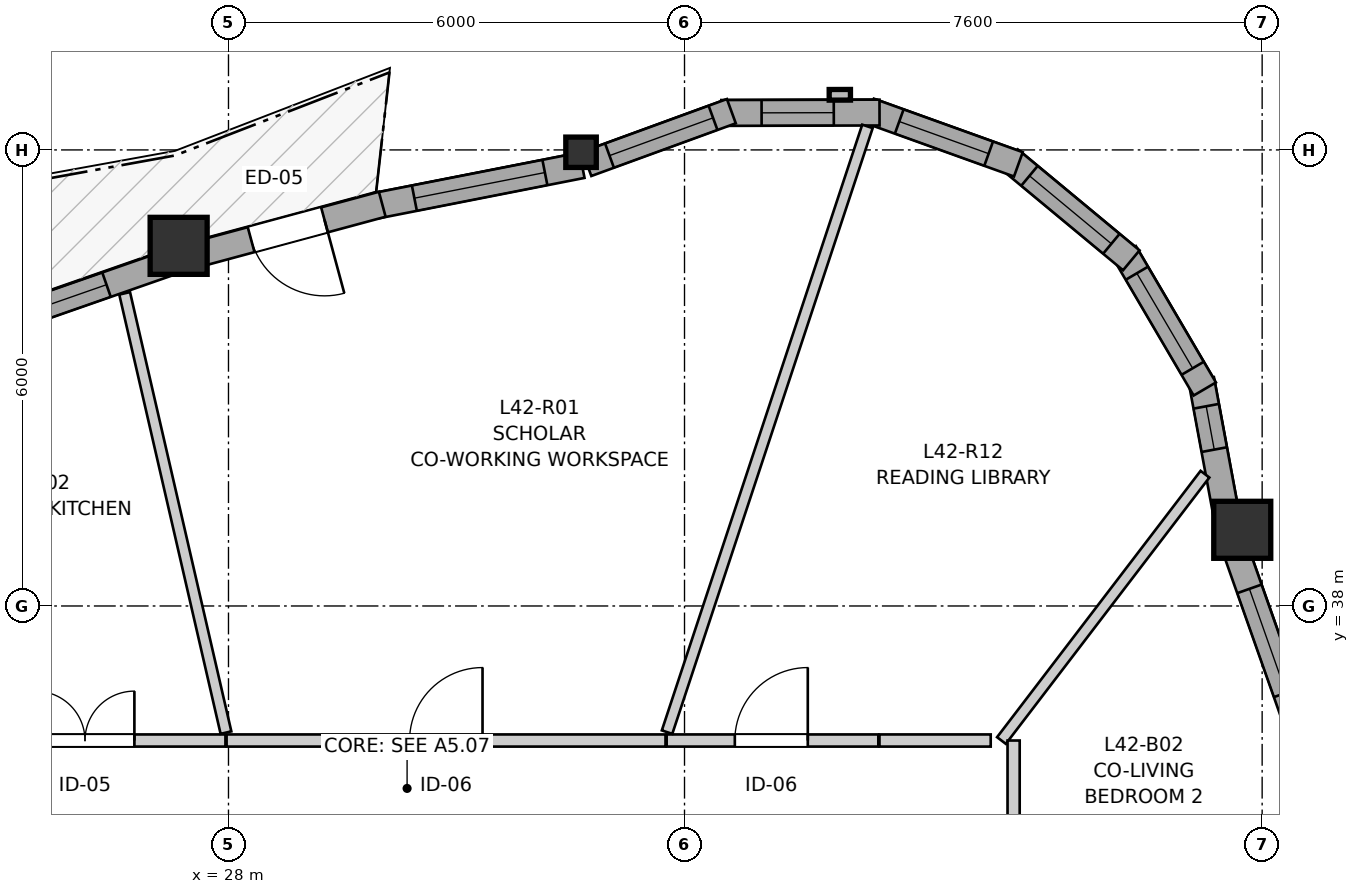
"""IFC4 building model, lengths in metres.
Left out: names, types, materials, properties, quantities, classifications, styles, units other than length and angle.
Written with IfcOpenShell. Run it as: python <this file> out.ifc"""

import sys

from ifc_helpers import new_model, si_unit, direction, frame, frame_2d, origin, origin_2d, place, context, subcontext, project, spatial, rectangle, i_section, extrude, source, transform, mapped, element, fill, save


model = new_model("IFC4")
c1 = context("Model", 3, precision=1e-05, world=origin(), true_north=direction((0.0, 1.0)))
c2 = subcontext(c1, "Body", "Model", "MODEL_VIEW")
j1 = project(units=[si_unit("LENGTHUNIT", "METRE"), si_unit("PLANEANGLEUNIT", "RADIAN")], contexts=[c1])
p1 = place(None, origin())
s1 = spatial("IfcSite", under=j1, at=p1, CompositionType="ELEMENT")
p2 = place(p1, origin())
s2 = spatial("IfcBuilding", under=s1, at=p2, CompositionType="ELEMENT")
p3 = place(p2, frame((0.0, 0.0, 142.6)))
s3 = spatial("IfcBuildingStorey", under=s2, at=p3, CompositionType="ELEMENT", Elevation=142.6)
m1 = source(origin(), c2, "Body", "SweptSolid", [
    extrude(rectangle(XDim=0.75, YDim=0.75, at=origin_2d()), origin(), (0.0, 0.0, 1.0), 2.95),
])
p4 = place(p3, frame((41.338, 39.002, 0.0), z_axis=(0.0, 0.0, 1.0), x_axis=(1.0, 0.0, 0.0)))
e1 = element("IfcColumn", 1, at=p4, inside=s3, PredefinedType="COLUMN", context=c2, shape_type="MappedRepresentation", body=[
    mapped(m1, transform((0.0, 0.0, 0.0), x_axis=(1.0, 0.0, 0.0), y_axis=(0.0, 1.0, 0.0), z_axis=(0.0, 0.0, 1.0), scale=1.0)),
])
m2 = source(origin(), c2, "Body", "SweptSolid", [
    extrude(i_section(OverallWidth=0.401, OverallDepth=0.399, WebThickness=0.023, FlangeThickness=0.036, FilletRadius=0.015, at=origin_2d()), origin(), (0.0, 0.0, 1.0), 2.95),
])
p5 = place(p3, frame((32.639, 43.969, 0.0), z_axis=(0.0, 0.0, 1.0), x_axis=(1.0, 0.0, 0.0)))
e2 = element("IfcColumn", 2, at=p5, inside=s3, PredefinedType="PILASTER", context=c2, shape_type="MappedRepresentation", body=[
    mapped(m2, transform((0.0, 0.0, 0.0), x_axis=(1.0, 0.0, 0.0), y_axis=(0.0, 1.0, 0.0), z_axis=(0.0, 0.0, 1.0), scale=1.0)),
])
p6 = place(p3, frame((27.344, 42.738, 0.0), z_axis=(0.0, 0.0, 1.0), x_axis=(1.0, 0.0, 0.0)))
e3 = element("IfcColumn", 3, at=p6, inside=s3, PredefinedType="COLUMN", context=c2, shape_type="MappedRepresentation", body=[
    mapped(m1, transform((0.0, 0.0, 0.0), x_axis=(1.0, 0.0, 0.0), y_axis=(0.0, 1.0, 0.0), z_axis=(0.0, 0.0, 1.0), scale=1.0)),
])
p7 = place(p3, frame((42.121, 36.274, 0.0), z_axis=(0.0, 0.0, 1.0), x_axis=(-0.332724751299, 0.943023986902, 0.0)))
e4 = element("IfcWall", 4, at=p7, inside=s3, PredefinedType="SOLIDWALL", context=c2, shape_type="SweptSolid", body=[
    extrude(rectangle(XDim=2.678, YDim=0.34, at=frame_2d((1.339, 0.0))), origin(), (0.0, 0.0, 1.0), 2.53),
])
p8 = place(p7, frame((0.619, 0.0, 0.82)))
e5 = element("IfcOpeningElement", 5, at=p8, cuts=e4, PredefinedType="OPENING", context=c2, shape_type="SweptSolid", body=[
    extrude(rectangle(XDim=1.45, YDim=1.25, at=frame_2d((0.725, 0.625))), frame((0.0, 0.18, 0.0), z_axis=(0.0, -1.0, 0.0), x_axis=(1.0, 0.0, 0.0)), (0.0, 0.0, 1.0), 0.36),
])
p9 = place(p3, frame((41.143, 39.124, 0.0), z_axis=(0.0, 0.0, 1.0), x_axis=(-0.182320770307, 0.983239104549, 0.0)))
e6 = element("IfcWall", 6, at=p9, inside=s3, PredefinedType="SOLIDWALL", context=c2, shape_type="SweptSolid", body=[
    extrude(rectangle(XDim=1.888, YDim=0.34, at=frame_2d((0.944, 0.0))), origin(), (0.0, 0.0, 1.0), 2.53),
])
p10 = place(p9, frame((0.949, 0.0, 0.82)))
e7 = element("IfcOpeningElement", 7, at=p10, cuts=e6, PredefinedType="OPENING", context=c2, shape_type="SweptSolid", body=[
    extrude(rectangle(XDim=0.58, YDim=1.35, at=frame_2d((0.29, 0.675))), frame((0.0, 0.18, 0.0), z_axis=(0.0, -1.0, 0.0), x_axis=(1.0, 0.0, 0.0)), (0.0, 0.0, 1.0), 0.36),
])
p11 = place(p3, frame((40.845, 40.855, 0.0), z_axis=(0.0, 0.0, 1.0), x_axis=(-0.506225227923, 0.862401309493, 0.0)))
e8 = element("IfcWall", 8, at=p11, inside=s3, PredefinedType="SOLIDWALL", context=c2, shape_type="SweptSolid", body=[
    extrude(rectangle(XDim=2.081, YDim=0.34, at=frame_2d((1.041, 0.0))), origin(), (0.0, 0.0, 1.0), 2.53),
])
p12 = place(p11, frame((0.316, 0.0, 0.82)))
e9 = element("IfcOpeningElement", 9, at=p12, cuts=e8, PredefinedType="OPENING", context=c2, shape_type="SweptSolid", body=[
    extrude(rectangle(XDim=1.45, YDim=1.25, at=frame_2d((0.725, 0.625))), frame((0.0, 0.18, 0.0), z_axis=(0.0, -1.0, 0.0), x_axis=(1.0, 0.0, 0.0)), (0.0, 0.0, 1.0), 0.36),
])
p13 = place(p3, frame((39.878, 42.548, 0.0), z_axis=(0.0, 0.0, 1.0), x_axis=(-0.769690471148, 0.63841724493, 0.0)))
e10 = element("IfcWall", 10, at=p13, inside=s3, PredefinedType="SOLIDWALL", context=c2, shape_type="SweptSolid", body=[
    extrude(rectangle(XDim=2.081, YDim=0.34, at=frame_2d((1.041, 0.0))), origin(), (0.0, 0.0, 1.0), 2.53),
])
p14 = place(p13, frame((0.341, 0.0, 0.82)))
e11 = element("IfcOpeningElement", 11, at=p14, cuts=e10, PredefinedType="OPENING", context=c2, shape_type="SweptSolid", body=[
    extrude(rectangle(XDim=1.4, YDim=1.35, at=frame_2d((0.7, 0.675))), frame((0.0, 0.18, 0.0), z_axis=(0.0, -1.0, 0.0), x_axis=(1.0, 0.0, 0.0)), (0.0, 0.0, 1.0), 0.36),
])
p15 = place(p3, frame((38.393, 43.81, 0.0), z_axis=(0.0, 0.0, 1.0), x_axis=(-0.941033874027, 0.338312352617, 0.0)))
e12 = element("IfcWall", 12, at=p15, inside=s3, PredefinedType="SOLIDWALL", context=c2, shape_type="SweptSolid", body=[
    extrude(rectangle(XDim=2.081, YDim=0.34, at=frame_2d((1.041, 0.0))), origin(), (0.0, 0.0, 1.0), 2.53),
])
p16 = place(p15, frame((0.416, 0.0, 0.82)))
e13 = element("IfcOpeningElement", 13, at=p16, cuts=e12, PredefinedType="OPENING", context=c2, shape_type="SweptSolid", body=[
    extrude(rectangle(XDim=1.25, YDim=1.35, at=frame_2d((0.625, 0.675))), frame((0.0, 0.18, 0.0), z_axis=(0.0, -1.0, 0.0), x_axis=(1.0, 0.0, 0.0)), (0.0, 0.0, 1.0), 0.36),
])
p17 = place(p3, frame((36.566, 44.491, 0.0), z_axis=(0.0, 0.0, 1.0), x_axis=(-0.999996965984, -0.002463335635, 0.0)))
e14 = element("IfcWall", 14, at=p17, inside=s3, PredefinedType="SOLIDWALL", context=c2, shape_type="SweptSolid", body=[
    extrude(rectangle(XDim=2.081, YDim=0.34, at=frame_2d((1.041, 0.0))), origin(), (0.0, 0.0, 1.0), 2.53),
])
p18 = place(p17, frame((0.602, 0.0, 0.82)))
e15 = element("IfcOpeningElement", 15, at=p18, cuts=e14, PredefinedType="OPENING", context=c2, shape_type="SweptSolid", body=[
    extrude(rectangle(XDim=0.95, YDim=1.35, at=frame_2d((0.475, 0.675))), frame((0.0, 0.18, 0.0), z_axis=(0.0, -1.0, 0.0), x_axis=(1.0, 0.0, 0.0)), (0.0, 0.0, 1.0), 0.36),
])
p19 = place(p3, frame((34.616, 44.51, 0.0), z_axis=(0.0, 0.0, 1.0), x_axis=(-0.939426417976, -0.342750645819, 0.0)))
e16 = element("IfcWall", 16, at=p19, inside=s3, PredefinedType="SOLIDWALL", context=c2, shape_type="SweptSolid", body=[
    extrude(rectangle(XDim=2.023, YDim=0.34, at=frame_2d((1.011, 0.0))), origin(), (0.0, 0.0, 1.0), 2.53),
])
p20 = place(p19, frame((0.257, 0.0, 0.82)))
e17 = element("IfcOpeningElement", 17, at=p20, cuts=e16, PredefinedType="OPENING", context=c2, shape_type="SweptSolid", body=[
    extrude(rectangle(XDim=1.45, YDim=1.25, at=frame_2d((0.725, 0.625))), frame((0.0, 0.18, 0.0), z_axis=(0.0, -1.0, 0.0), x_axis=(1.0, 0.0, 0.0)), (0.0, 0.0, 1.0), 0.36),
])
p21 = place(p3, frame((32.652, 43.799, 0.0), z_axis=(0.0, 0.0, 1.0), x_axis=(-0.98123033563, -0.192839385083, 0.0)))
e18 = element("IfcWall", 18, at=p21, inside=s3, PredefinedType="SOLIDWALL", context=c2, shape_type="SweptSolid", body=[
    extrude(rectangle(XDim=2.766, YDim=0.34, at=frame_2d((1.383, 0.0))), origin(), (0.0, 0.0, 1.0), 2.53),
])
p22 = place(p21, frame((0.498, 0.0, 0.82)))
e19 = element("IfcOpeningElement", 19, at=p22, cuts=e18, PredefinedType="OPENING", context=c2, shape_type="SweptSolid", body=[
    extrude(rectangle(XDim=1.75, YDim=1.3, at=frame_2d((0.875, 0.65))), frame((0.0, 0.18, 0.0), z_axis=(0.0, -1.0, 0.0), x_axis=(1.0, 0.0, 0.0)), (0.0, 0.0, 1.0), 0.36),
])
p23 = place(p3, frame((30.023, 43.285, 0.0), z_axis=(0.0, 0.0, 1.0), x_axis=(-0.965478241218, -0.260483714913, 0.0)))
e20 = element("IfcWall", 20, at=p23, inside=s3, PredefinedType="SOLIDWALL", context=c2, shape_type="SweptSolid", body=[
    extrude(rectangle(XDim=2.574, YDim=0.34, at=frame_2d((1.287, 0.0))), origin(), (0.0, 0.0, 1.0), 2.53),
])
p24 = place(p23, frame((0.787, 0.0, 0.0)))
e21 = element("IfcOpeningElement", 21, at=p24, cuts=e20, PredefinedType="OPENING", context=c2, shape_type="SweptSolid", body=[
    extrude(rectangle(XDim=1.0, YDim=2.1, at=frame_2d((0.5, 1.05))), frame((0.0, 0.18, 0.0), z_axis=(0.0, -1.0, 0.0), x_axis=(1.0, 0.0, 0.0)), (0.0, 0.0, 1.0), 0.36),
])
p25 = place(p3, frame((27.254, 42.527, 0.0), z_axis=(0.0, 0.0, 1.0), x_axis=(-0.944140843313, -0.329542209721, 0.0)))
e22 = element("IfcWall", 22, at=p25, inside=s3, PredefinedType="SOLIDWALL", context=c2, shape_type="SweptSolid", body=[
    extrude(rectangle(XDim=2.53, YDim=0.34, at=frame_2d((1.265, 0.0))), origin(), (0.0, 0.0, 1.0), 2.53),
])
p26 = place(p25, frame((0.909, 0.0, 0.82)))
e23 = element("IfcOpeningElement", 23, at=p26, cuts=e22, PredefinedType="OPENING", context=c2, shape_type="SweptSolid", body=[
    extrude(rectangle(XDim=1.35, YDim=1.45, at=frame_2d((0.675, 0.725))), frame((0.0, 0.18, 0.0), z_axis=(0.0, -1.0, 0.0), x_axis=(1.0, 0.0, 0.0)), (0.0, 0.0, 1.0), 0.36),
])
p27 = place(p3, frame((27.975, 36.23, 0.0), z_axis=(0.0, 0.0, 1.0), x_axis=(1.0, 0.0, 0.0)))
e24 = element("IfcWall", 24, at=p27, inside=s3, PredefinedType="PARTITIONING", context=c2, shape_type="SweptSolid", body=[
    extrude(rectangle(XDim=5.775, YDim=0.16, at=frame_2d((2.887, 0.0))), origin(), (0.0, 0.0, 1.0), 2.588),
])
p28 = place(p27, frame((2.407, 0.0, 0.0)))
e25 = element("IfcOpeningElement", 25, at=p28, cuts=e24, PredefinedType="OPENING", context=c2, shape_type="SweptSolid", body=[
    extrude(rectangle(XDim=0.96, YDim=2.1, at=frame_2d((0.48, 1.05))), frame((0.0, 0.09, 0.0), z_axis=(0.0, -1.0, 0.0), x_axis=(1.0, 0.0, 0.0)), (0.0, 0.0, 1.0), 0.18),
])
p29 = place(p3, frame((24.215, 36.23, 0.0), z_axis=(0.0, 0.0, 1.0), x_axis=(1.0, 0.0, 0.0)))
e26 = element("IfcWall", 26, at=p29, inside=s3, PredefinedType="PARTITIONING", context=c2, shape_type="SweptSolid", body=[
    extrude(rectangle(XDim=3.745, YDim=0.16, at=frame_2d((1.873, 0.0))), origin(), (0.0, 0.0, 1.0), 2.95),
])
p30 = place(p29, frame((1.247, 0.0, 0.0)))
e27 = element("IfcOpeningElement", 27, at=p30, cuts=e26, PredefinedType="OPENING", context=c2, shape_type="SweptSolid", body=[
    extrude(rectangle(XDim=1.3, YDim=2.1, at=frame_2d((0.65, 1.05))), frame((0.0, 0.09, 0.0), z_axis=(0.0, -1.0, 0.0), x_axis=(1.0, 0.0, 0.0)), (0.0, 0.0, 1.0), 0.18),
])
p31 = place(p3, frame((33.765, 36.23, 0.0), z_axis=(0.0, 0.0, 1.0), x_axis=(1.0, 0.0, 0.0)))
e28 = element("IfcWall", 28, at=p31, inside=s3, PredefinedType="PARTITIONING", context=c2, shape_type="SweptSolid", body=[
    extrude(rectangle(XDim=2.785, YDim=0.16, at=frame_2d((1.393, 0.0))), origin(), (0.0, 0.0, 1.0), 2.588),
])
p32 = place(p31, frame((0.897, 0.0, 0.0)))
e29 = element("IfcOpeningElement", 29, at=p32, cuts=e28, PredefinedType="OPENING", context=c2, shape_type="SweptSolid", body=[
    extrude(rectangle(XDim=0.96, YDim=2.1, at=frame_2d((0.48, 1.05))), frame((0.0, 0.09, 0.0), z_axis=(0.0, -1.0, 0.0), x_axis=(1.0, 0.0, 0.0)), (0.0, 0.0, 1.0), 0.18),
])
p33 = place(p3, frame((33.771, 36.34, 0.0), z_axis=(0.0, 0.0, 1.0), x_axis=(0.314080540859, 0.949396341816, 0.0)))
e30 = element("IfcWall", 30, at=p33, inside=s3, PredefinedType="PARTITIONING", context=c2, shape_type="SweptSolid", body=[
    extrude(rectangle(XDim=8.394, YDim=0.145, at=frame_2d((4.197, 0.0))), origin(), (0.0, 0.0, 1.0), 2.95),
])
p34 = place(p3, frame((26.634, 42.113, 0.0), z_axis=(0.0, 0.0, 1.0), x_axis=(0.224790361783, -0.97440714963, 0.0)))
e31 = element("IfcWall", 31, at=p34, inside=s3, PredefinedType="PARTITIONING", context=c2, shape_type="SweptSolid", body=[
    extrude(rectangle(XDim=5.931, YDim=0.145, at=frame_2d((2.966, 0.0))), origin(), (0.0, 0.0, 1.0), 2.95),
])
p35 = place(p3, frame((38.17, 36.23, 0.0), z_axis=(0.0, 0.0, 1.0), x_axis=(0.607203490548, 0.794546361811, 0.0)))
e32 = element("IfcWall", 32, at=p35, inside=s3, PredefinedType="PARTITIONING", context=c2, shape_type="SweptSolid", body=[
    extrude(rectangle(XDim=4.41, YDim=0.145, at=frame_2d((2.205, 0.0))), origin(), (0.0, 0.0, 1.0), 2.95),
])
p36 = place(p3, frame((38.33, 34.465, 0.0), z_axis=(0.0, 0.0, 1.0), x_axis=(0.0, 1.0, 0.0)))
e33 = element("IfcWall", 33, at=p36, inside=s3, PredefinedType="PARTITIONING", context=c2, shape_type="SweptSolid", body=[
    extrude(rectangle(XDim=1.765, YDim=0.16, at=frame_2d((0.882, 0.0))), origin(), (0.0, 0.0, 1.0), 2.588),
])
p37 = place(p3, frame((36.565, 36.23, 0.0), z_axis=(0.0, 0.0, 1.0), x_axis=(1.0, 0.0, 0.0)))
e34 = element("IfcWall", 34, at=p37, inside=s3, PredefinedType="PARTITIONING", context=c2, shape_type="SweptSolid", body=[
    extrude(rectangle(XDim=1.464, YDim=0.16, at=frame_2d((0.732, 0.0))), origin(), (0.0, 0.0, 1.0), 2.95),
])
m3 = source(origin(), c2, "Body", "SweptSolid", [
    extrude(rectangle(XDim=1.45, YDim=1.25, at=frame_2d((0.725, 0.625))), frame((0.0, 0.03, 0.0), z_axis=(0.0, -1.0, 0.0), x_axis=(1.0, 0.0, 0.0)), (0.0, 0.0, 1.0), 0.06),
])
p38 = place(p8, origin())
e35 = element("IfcWindow", 35, at=p38, inside=s3, PartitioningType="SINGLE_PANEL", PredefinedType="WINDOW", context=c2, shape_type="MappedRepresentation", body=[
    mapped(m3, transform((0.0, 0.0, 0.0), x_axis=(1.0, 0.0, 0.0), y_axis=(0.0, 1.0, 0.0), z_axis=(0.0, 0.0, 1.0), scale=1.0)),
])
fill(e5, e35)
m4 = source(origin(), c2, "Body", "SweptSolid", [
    extrude(rectangle(XDim=0.58, YDim=1.35, at=frame_2d((0.29, 0.675))), frame((0.0, 0.03, 0.0), z_axis=(0.0, -1.0, 0.0), x_axis=(1.0, 0.0, 0.0)), (0.0, 0.0, 1.0), 0.06),
])
p39 = place(p10, origin())
e36 = element("IfcWindow", 36, at=p39, inside=s3, PartitioningType="SINGLE_PANEL", PredefinedType="WINDOW", context=c2, shape_type="MappedRepresentation", body=[
    mapped(m4, transform((0.0, 0.0, 0.0), x_axis=(1.0, 0.0, 0.0), y_axis=(0.0, 1.0, 0.0), z_axis=(0.0, 0.0, 1.0), scale=1.0)),
])
fill(e7, e36)
p40 = place(p12, origin())
e37 = element("IfcWindow", 37, at=p40, inside=s3, PartitioningType="SINGLE_PANEL", PredefinedType="WINDOW", context=c2, shape_type="MappedRepresentation", body=[
    mapped(m3, transform((0.0, 0.0, 0.0), x_axis=(1.0, 0.0, 0.0), y_axis=(0.0, 1.0, 0.0), z_axis=(0.0, 0.0, 1.0), scale=1.0)),
])
fill(e9, e37)
m5 = source(origin(), c2, "Body", "SweptSolid", [
    extrude(rectangle(XDim=1.4, YDim=1.35, at=frame_2d((0.7, 0.675))), frame((0.0, 0.03, 0.0), z_axis=(0.0, -1.0, 0.0), x_axis=(1.0, 0.0, 0.0)), (0.0, 0.0, 1.0), 0.06),
])
p41 = place(p14, origin())
e38 = element("IfcWindow", 38, at=p41, inside=s3, PartitioningType="SINGLE_PANEL", PredefinedType="WINDOW", context=c2, shape_type="MappedRepresentation", body=[
    mapped(m5, transform((0.0, 0.0, 0.0), x_axis=(1.0, 0.0, 0.0), y_axis=(0.0, 1.0, 0.0), z_axis=(0.0, 0.0, 1.0), scale=1.0)),
])
fill(e11, e38)
m6 = source(origin(), c2, "Body", "SweptSolid", [
    extrude(rectangle(XDim=1.25, YDim=1.35, at=frame_2d((0.625, 0.675))), frame((0.0, 0.03, 0.0), z_axis=(0.0, -1.0, 0.0), x_axis=(1.0, 0.0, 0.0)), (0.0, 0.0, 1.0), 0.06),
])
p42 = place(p16, origin())
e39 = element("IfcWindow", 39, at=p42, inside=s3, PartitioningType="SINGLE_PANEL", PredefinedType="WINDOW", context=c2, shape_type="MappedRepresentation", body=[
    mapped(m6, transform((0.0, 0.0, 0.0), x_axis=(1.0, 0.0, 0.0), y_axis=(0.0, 1.0, 0.0), z_axis=(0.0, 0.0, 1.0), scale=1.0)),
])
fill(e13, e39)
m7 = source(origin(), c2, "Body", "SweptSolid", [
    extrude(rectangle(XDim=0.95, YDim=1.35, at=frame_2d((0.475, 0.675))), frame((0.0, 0.03, 0.0), z_axis=(0.0, -1.0, 0.0), x_axis=(1.0, 0.0, 0.0)), (0.0, 0.0, 1.0), 0.06),
])
p43 = place(p18, origin())
e40 = element("IfcWindow", 40, at=p43, inside=s3, PartitioningType="SINGLE_PANEL", PredefinedType="WINDOW", context=c2, shape_type="MappedRepresentation", body=[
    mapped(m7, transform((0.0, 0.0, 0.0), x_axis=(1.0, 0.0, 0.0), y_axis=(0.0, 1.0, 0.0), z_axis=(0.0, 0.0, 1.0), scale=1.0)),
])
fill(e15, e40)
p44 = place(p20, origin())
e41 = element("IfcWindow", 41, at=p44, inside=s3, PartitioningType="SINGLE_PANEL", PredefinedType="WINDOW", context=c2, shape_type="MappedRepresentation", body=[
    mapped(m3, transform((0.0, 0.0, 0.0), x_axis=(1.0, 0.0, 0.0), y_axis=(0.0, 1.0, 0.0), z_axis=(0.0, 0.0, 1.0), scale=1.0)),
])
fill(e17, e41)
m8 = source(origin(), c2, "Body", "SweptSolid", [
    extrude(rectangle(XDim=1.75, YDim=1.3, at=frame_2d((0.875, 0.65))), frame((0.0, 0.03, 0.0), z_axis=(0.0, -1.0, 0.0), x_axis=(1.0, 0.0, 0.0)), (0.0, 0.0, 1.0), 0.06),
])
p45 = place(p22, origin())
e42 = element("IfcWindow", 42, at=p45, inside=s3, PartitioningType="SINGLE_PANEL", PredefinedType="WINDOW", context=c2, shape_type="MappedRepresentation", body=[
    mapped(m8, transform((0.0, 0.0, 0.0), x_axis=(1.0, 0.0, 0.0), y_axis=(0.0, 1.0, 0.0), z_axis=(0.0, 0.0, 1.0), scale=1.0)),
])
fill(e19, e42)
m9 = source(origin(), c2, "Body", "SweptSolid", [
    extrude(rectangle(XDim=1.35, YDim=1.45, at=frame_2d((0.675, 0.725))), frame((0.0, 0.03, 0.0), z_axis=(0.0, -1.0, 0.0), x_axis=(1.0, 0.0, 0.0)), (0.0, 0.0, 1.0), 0.06),
])
p46 = place(p26, origin())
e43 = element("IfcWindow", 43, at=p46, inside=s3, PartitioningType="SINGLE_PANEL", PredefinedType="WINDOW", context=c2, shape_type="MappedRepresentation", body=[
    mapped(m9, transform((0.0, 0.0, 0.0), x_axis=(1.0, 0.0, 0.0), y_axis=(0.0, 1.0, 0.0), z_axis=(0.0, 0.0, 1.0), scale=1.0)),
])
fill(e23, e43)
m10 = source(origin(), c2, "Body", "SweptSolid", [
    extrude(rectangle(XDim=1.0, YDim=2.1, at=frame_2d((0.5, 1.05))), frame((0.0, 0.025, 0.0), z_axis=(0.0, -1.0, 0.0), x_axis=(1.0, 0.0, 0.0)), (0.0, 0.0, 1.0), 0.05),
])
p47 = place(p24, origin())
e44 = element("IfcDoor", 44, at=p47, inside=s3, OperationType="SINGLE_SWING_LEFT", PredefinedType="DOOR", context=c2, shape_type="MappedRepresentation", body=[
    mapped(m10, transform((0.0, 0.0, 0.0), x_axis=(1.0, 0.0, 0.0), y_axis=(0.0, 1.0, 0.0), z_axis=(0.0, 0.0, 1.0), scale=1.0)),
])
fill(e21, e44)
m11 = source(origin(), c2, "Body", "SweptSolid", [
    extrude(rectangle(XDim=0.96, YDim=2.1, at=frame_2d((0.48, 1.05))), frame((0.0, 0.025, 0.0), z_axis=(0.0, -1.0, 0.0), x_axis=(1.0, 0.0, 0.0)), (0.0, 0.0, 1.0), 0.05),
])
p48 = place(p28, origin())
e45 = element("IfcDoor", 45, at=p48, inside=s3, OperationType="SINGLE_SWING_RIGHT", PredefinedType="DOOR", context=c2, shape_type="MappedRepresentation", body=[
    mapped(m11, transform((0.0, 0.0, 0.0), x_axis=(1.0, 0.0, 0.0), y_axis=(0.0, 1.0, 0.0), z_axis=(0.0, 0.0, 1.0), scale=1.0)),
])
fill(e25, e45)
m12 = source(origin(), c2, "Body", "SweptSolid", [
    extrude(rectangle(XDim=1.3, YDim=2.1, at=frame_2d((0.65, 1.05))), frame((0.0, 0.025, 0.0), z_axis=(0.0, -1.0, 0.0), x_axis=(1.0, 0.0, 0.0)), (0.0, 0.0, 1.0), 0.05),
])
p49 = place(p30, origin())
e46 = element("IfcDoor", 46, at=p49, inside=s3, OperationType="DOUBLE_DOOR_SINGLE_SWING", PredefinedType="DOOR", context=c2, shape_type="MappedRepresentation", body=[
    mapped(m12, transform((0.0, 0.0, 0.0), x_axis=(1.0, 0.0, 0.0), y_axis=(0.0, 1.0, 0.0), z_axis=(0.0, 0.0, 1.0), scale=1.0)),
])
fill(e27, e46)
p50 = place(p32, origin())
e47 = element("IfcDoor", 47, at=p50, inside=s3, OperationType="SINGLE_SWING_RIGHT", PredefinedType="DOOR", context=c2, shape_type="MappedRepresentation", body=[
    mapped(m11, transform((0.0, 0.0, 0.0), x_axis=(1.0, 0.0, 0.0), y_axis=(0.0, 1.0, 0.0), z_axis=(0.0, 0.0, 1.0), scale=1.0)),
])
fill(e29, e47)
save(model, sys.argv[1])
